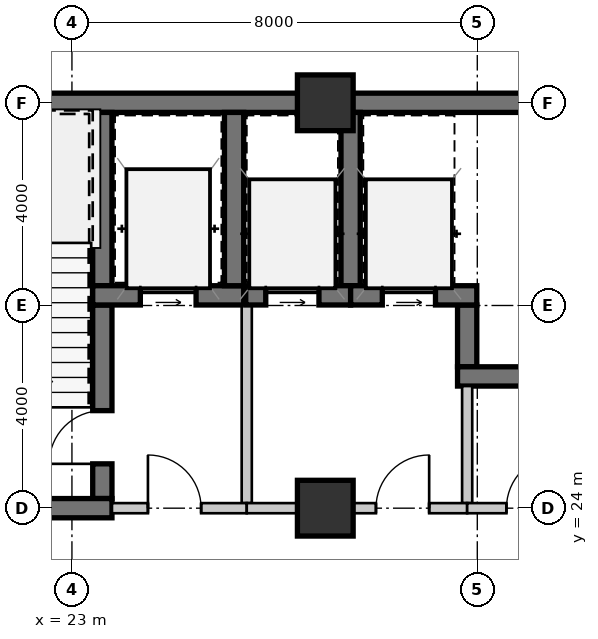
"""IFC4 building model, lengths in metres.
Left out: names, types, materials, properties, quantities, classifications, styles, units other than length and angle.
Written with IfcOpenShell. Run it as: python <this file> out.ifc"""

import sys

from ifc_helpers import new_model, si_unit, direction, frame, frame_2d, origin, origin_2d, place, context, subcontext, project, spatial, rectangle, extrude, source, transform, mapped, element, fill, save


model = new_model("IFC4")
c1 = context("Model", 3, precision=1e-05, world=origin(), true_north=direction((0.0, 1.0)))
c2 = subcontext(c1, "Body", "Model", "MODEL_VIEW")
j1 = project(units=[si_unit("LENGTHUNIT", "METRE"), si_unit("PLANEANGLEUNIT", "RADIAN")], contexts=[c1])
p1 = place(None, origin())
s1 = spatial("IfcSite", under=j1, at=p1, CompositionType="ELEMENT")
p2 = place(p1, origin())
s2 = spatial("IfcBuilding", under=s1, at=p2, CompositionType="ELEMENT")
p3 = place(p2, frame((0.0, 0.0, 12.95)))
s3 = spatial("IfcBuildingStorey", under=s2, at=p3, CompositionType="ELEMENT", Elevation=12.95)
m1 = source(origin(), c2, "Body", "SweptSolid", [
    extrude(rectangle(XDim=1.1, YDim=1.1, at=origin_2d()), origin(), (0.0, 0.0, 1.0), 3.85),
])
for number, where, z_axis, x_axis in (
    (1, (28.0, 24.0, 0.0), (0.0, 0.0, 1.0), (1.0, 0.0, 0.0)),
    (2, (28.0, 32.0, 0.0), (0.0, 0.0, 1.0), (1.0, 0.0, 0.0)),
):
    element("IfcColumn", number, at=place(p3, frame(where, z_axis=z_axis, x_axis=x_axis)), inside=s3, PredefinedType="COLUMN", context=c2, shape_type="MappedRepresentation", body=[
        mapped(m1, transform((0.0, 0.0, 0.0), scale=1.0)),
    ])
m2 = source(origin(), c2, "Body", "SweptSolid", [
    extrude(rectangle(XDim=9.19, YDim=0.38, at=frame_2d((4.595, 0.0))), origin(), (0.0, 0.0, 1.0), 3.43),
])
p4 = place(p3, frame((18.81, 32.0, 0.0), z_axis=(0.0, 0.0, 1.0), x_axis=(1.0, 0.0, 0.0)))
e3 = element("IfcWall", 3, at=p4, inside=s3, PredefinedType="SHEAR", context=c2, shape_type="MappedRepresentation", body=[
    mapped(m2, transform((0.0, 0.0, 0.0), scale=1.0)),
])
m3 = source(origin(), c2, "Body", "SweptSolid", [
    extrude(rectangle(XDim=11.2, YDim=0.38, at=frame_2d((5.6, 0.0))), origin(), (0.0, 0.0, 1.0), 3.43),
])
p5 = place(p3, frame((28.0, 32.0, 0.0), z_axis=(0.0, 0.0, 1.0), x_axis=(1.0, 0.0, 0.0)))
e4 = element("IfcWall", 4, at=p5, inside=s3, PredefinedType="SHEAR", context=c2, shape_type="MappedRepresentation", body=[
    mapped(m3, transform((0.0, 0.0, 0.0), scale=1.0)),
])
m4 = source(origin(), c2, "Body", "SweptSolid", [
    extrude(rectangle(XDim=3.42, YDim=0.38, at=frame_2d((1.71, 0.0))), origin(), (0.0, 0.0, 1.0), 3.43),
])
p6 = place(p3, frame((23.6, 28.39, 0.0), z_axis=(0.0, 0.0, 1.0), x_axis=(0.0, 1.0, 0.0)))
e5 = element("IfcWall", 5, at=p6, inside=s3, PredefinedType="SHEAR", context=c2, shape_type="MappedRepresentation", body=[
    mapped(m4, transform((0.0, 0.0, 0.0), scale=1.0)),
])
m5 = source(origin(), c2, "Body", "SweptSolid", [
    extrude(rectangle(XDim=3.82, YDim=0.38, at=frame_2d((1.91, 0.0))), origin(), (0.0, 0.0, 1.0), 3.43),
])
p7 = place(p3, frame((23.6, 24.19, 0.0), z_axis=(0.0, 0.0, 1.0), x_axis=(0.0, 1.0, 0.0)))
e6 = element("IfcWall", 6, at=p7, inside=s3, PredefinedType="SHEAR", context=c2, shape_type="MappedRepresentation", body=[
    mapped(m5, transform((0.0, 0.0, 0.0), scale=1.0)),
])
m6 = source(origin(), c2, "Body", "SweptSolid", [
    extrude(rectangle(XDim=1.05, YDim=2.1, at=frame_2d((0.525, 1.05))), frame((0.0, 0.2, 0.0), z_axis=(0.0, -1.0, 0.0), x_axis=(1.0, 0.0, 0.0)), (0.0, 0.0, 1.0), 0.4),
])
p8 = place(p7, frame((0.685, 0.0, 0.0)))
e7 = element("IfcOpeningElement", 7, at=p8, cuts=e6, PredefinedType="OPENING", context=c2, shape_type="MappedRepresentation", body=[
    mapped(m6, transform((0.0, 0.0, 0.0), scale=1.0)),
])
m7 = source(origin(), c2, "Body", "SweptSolid", [
    extrude(rectangle(XDim=4.98, YDim=0.38, at=frame_2d((2.49, 0.0))), origin(), (0.0, 0.0, 1.0), 3.43),
])
p9 = place(p3, frame((18.81, 24.0, 0.0), z_axis=(0.0, 0.0, 1.0), x_axis=(1.0, 0.0, 0.0)))
e8 = element("IfcWall", 8, at=p9, inside=s3, PredefinedType="SHEAR", context=c2, shape_type="MappedRepresentation", body=[
    mapped(m7, transform((0.0, 0.0, 0.0), scale=1.0)),
])
m8 = source(origin(), c2, "Body", "SweptSolid", [
    extrude(rectangle(XDim=2.98, YDim=0.38, at=frame_2d((1.49, 0.0))), origin(), (0.0, 0.0, 1.0), 3.43),
])
p10 = place(p3, frame((23.41, 28.2, 0.0), z_axis=(0.0, 0.0, 1.0), x_axis=(1.0, 0.0, 0.0)))
e9 = element("IfcWall", 9, at=p10, inside=s3, PredefinedType="SHEAR", context=c2, shape_type="MappedRepresentation", body=[
    mapped(m8, transform((0.0, 0.0, 0.0), scale=1.0)),
])
m9 = source(origin(), c2, "Body", "SweptSolid", [
    extrude(rectangle(XDim=1.1, YDim=2.15, at=frame_2d((0.55, 1.075))), frame((0.0, 0.2, 0.0), z_axis=(0.0, -1.0, 0.0), x_axis=(1.0, 0.0, 0.0)), (0.0, 0.0, 1.0), 0.4),
])
p11 = place(p10, frame((0.94, 0.0, 0.0)))
e10 = element("IfcOpeningElement", 10, at=p11, cuts=e9, PredefinedType="OPENING", context=c2, shape_type="MappedRepresentation", body=[
    mapped(m9, transform((0.0, 0.0, 0.0), scale=1.0)),
])
p12 = place(p3, frame((26.2, 28.39, 0.0), z_axis=(0.0, 0.0, 1.0), x_axis=(0.0, 1.0, 0.0)))
e11 = element("IfcWall", 11, at=p12, inside=s3, PredefinedType="SHEAR", context=c2, shape_type="MappedRepresentation", body=[
    mapped(m4, transform((0.0, 0.0, 0.0), scale=1.0)),
])
m10 = source(origin(), c2, "Body", "SweptSolid", [
    extrude(rectangle(XDim=3.91, YDim=0.2, at=frame_2d((1.955, 0.0))), origin(), (0.0, 0.0, 1.0), 3.43),
])
p13 = place(p3, frame((26.45, 24.1, 0.0), z_axis=(0.0, 0.0, 1.0), x_axis=(0.0, 1.0, 0.0)))
e12 = element("IfcWall", 12, at=p13, inside=s3, PredefinedType="SOLIDWALL", context=c2, shape_type="MappedRepresentation", body=[
    mapped(m10, transform((0.0, 0.0, 0.0), scale=1.0)),
])
m11 = source(origin(), c2, "Body", "SweptSolid", [
    extrude(rectangle(XDim=2.66, YDim=0.2, at=frame_2d((1.33, 0.0))), origin(), (0.0, 0.0, 1.0), 2.97),
])
p14 = place(p3, frame((23.79, 24.0, 0.0), z_axis=(0.0, 0.0, 1.0), x_axis=(1.0, 0.0, 0.0)))
e13 = element("IfcWall", 13, at=p14, inside=s3, PredefinedType="SOLIDWALL", context=c2, shape_type="MappedRepresentation", body=[
    mapped(m11, transform((0.0, 0.0, 0.0), scale=1.0)),
])
m12 = source(origin(), c2, "Body", "SweptSolid", [
    extrude(rectangle(XDim=1.05, YDim=2.1, at=frame_2d((0.525, 1.05))), frame((0.0, 0.11, 0.0), z_axis=(0.0, -1.0, 0.0), x_axis=(1.0, 0.0, 0.0)), (0.0, 0.0, 1.0), 0.22),
])
p15 = place(p14, frame((0.71, 0.0, 0.0)))
e14 = element("IfcOpeningElement", 14, at=p15, cuts=e13, PredefinedType="OPENING", context=c2, shape_type="MappedRepresentation", body=[
    mapped(m12, transform((0.0, 0.0, 0.0), scale=1.0)),
])
m13 = source(origin(), c2, "Body", "SweptSolid", [
    extrude(rectangle(XDim=1.22, YDim=0.38, at=frame_2d((0.61, 0.0))), origin(), (0.0, 0.0, 1.0), 3.43),
])
p16 = place(p3, frame((30.8, 28.01, 0.0), z_axis=(0.0, 0.0, 1.0), x_axis=(0.0, -1.0, 0.0)))
e15 = element("IfcWall", 15, at=p16, inside=s3, PredefinedType="SHEAR", context=c2, shape_type="MappedRepresentation", body=[
    mapped(m13, transform((0.0, 0.0, 0.0), scale=1.0)),
])
m14 = source(origin(), c2, "Body", "SweptSolid", [
    extrude(rectangle(XDim=2.24, YDim=0.38, at=frame_2d((1.12, 0.0))), origin(), (0.0, 0.0, 1.0), 3.43),
])
p17 = place(p3, frame((30.61, 26.6, 0.0), z_axis=(0.0, 0.0, 1.0), x_axis=(1.0, 0.0, 0.0)))
e16 = element("IfcWall", 16, at=p17, inside=s3, PredefinedType="SHEAR", context=c2, shape_type="MappedRepresentation", body=[
    mapped(m14, transform((0.0, 0.0, 0.0), scale=1.0)),
])
p18 = place(p3, frame((28.5, 28.39, 0.0), z_axis=(0.0, 0.0, 1.0), x_axis=(0.0, 1.0, 0.0)))
e17 = element("IfcWall", 17, at=p18, inside=s3, PredefinedType="SHEAR", context=c2, shape_type="MappedRepresentation", body=[
    mapped(m4, transform((0.0, 0.0, 0.0), scale=1.0)),
])
m15 = source(origin(), c2, "Body", "SweptSolid", [
    extrude(rectangle(XDim=2.07, YDim=0.38, at=frame_2d((1.035, 0.0))), origin(), (0.0, 0.0, 1.0), 3.43),
])
p19 = place(p3, frame((26.43, 28.2, 0.0), z_axis=(0.0, 0.0, 1.0), x_axis=(1.0, 0.0, 0.0)))
e18 = element("IfcWall", 18, at=p19, inside=s3, PredefinedType="SHEAR", context=c2, shape_type="MappedRepresentation", body=[
    mapped(m15, transform((0.0, 0.0, 0.0), scale=1.0)),
])
m16 = source(origin(), c2, "Body", "SweptSolid", [
    extrude(rectangle(XDim=1.05, YDim=2.15, at=frame_2d((0.525, 1.075))), frame((0.0, 0.2, 0.0), z_axis=(0.0, -1.0, 0.0), x_axis=(1.0, 0.0, 0.0)), (0.0, 0.0, 1.0), 0.4),
])
p20 = place(p19, frame((0.395, 0.0, 0.0)))
e19 = element("IfcOpeningElement", 19, at=p20, cuts=e18, PredefinedType="OPENING", context=c2, shape_type="MappedRepresentation", body=[
    mapped(m16, transform((0.0, 0.0, 0.0), scale=1.0)),
])
m17 = source(origin(), c2, "Body", "SweptSolid", [
    extrude(rectangle(XDim=2.49, YDim=0.38, at=frame_2d((1.245, 0.0))), origin(), (0.0, 0.0, 1.0), 3.43),
])
p21 = place(p3, frame((28.5, 28.2, 0.0), z_axis=(0.0, 0.0, 1.0), x_axis=(1.0, 0.0, 0.0)))
e20 = element("IfcWall", 20, at=p21, inside=s3, PredefinedType="SHEAR", context=c2, shape_type="MappedRepresentation", body=[
    mapped(m17, transform((0.0, 0.0, 0.0), scale=1.0)),
])
p22 = place(p21, frame((0.625, 0.0, 0.0)))
e21 = element("IfcOpeningElement", 21, at=p22, cuts=e20, PredefinedType="OPENING", context=c2, shape_type="MappedRepresentation", body=[
    mapped(m16, transform((0.0, 0.0, 0.0), scale=1.0)),
])
m18 = source(origin(), c2, "Body", "SweptSolid", [
    extrude(rectangle(XDim=2.31, YDim=0.2, at=frame_2d((1.155, 0.0))), origin(), (0.0, 0.0, 1.0), 3.43),
])
p23 = place(p3, frame((30.8, 26.41, 0.0), z_axis=(0.0, 0.0, 1.0), x_axis=(0.0, -1.0, 0.0)))
e22 = element("IfcWall", 22, at=p23, inside=s3, PredefinedType="SOLIDWALL", context=c2, shape_type="MappedRepresentation", body=[
    mapped(m18, transform((0.0, 0.0, 0.0), scale=1.0)),
])
m19 = source(origin(), c2, "Body", "SweptSolid", [
    extrude(rectangle(XDim=4.35, YDim=0.2, at=frame_2d((2.175, 0.0))), origin(), (0.0, 0.0, 1.0), 2.97),
])
p24 = place(p3, frame((30.8, 24.0, 0.0), z_axis=(0.0, 0.0, 1.0), x_axis=(-1.0, 0.0, 0.0)))
e23 = element("IfcWall", 23, at=p24, inside=s3, PredefinedType="SOLIDWALL", context=c2, shape_type="MappedRepresentation", body=[
    mapped(m19, transform((0.0, 0.0, 0.0), scale=1.0)),
])
p25 = place(p24, frame((0.75, 0.0, 0.0)))
e24 = element("IfcOpeningElement", 24, at=p25, cuts=e23, PredefinedType="OPENING", context=c2, shape_type="MappedRepresentation", body=[
    mapped(m12, transform((0.0, 0.0, 0.0), scale=1.0)),
])
m20 = source(origin(), c2, "Body", "SweptSolid", [
    extrude(rectangle(XDim=2.6, YDim=0.2, at=frame_2d((1.3, 0.0))), origin(), (0.0, 0.0, 1.0), 2.97),
])
p26 = place(p3, frame((33.4, 24.0, 0.0), z_axis=(0.0, 0.0, 1.0), x_axis=(-1.0, 0.0, 0.0)))
e25 = element("IfcWall", 25, at=p26, inside=s3, PredefinedType="SOLIDWALL", context=c2, shape_type="MappedRepresentation", body=[
    mapped(m20, transform((0.0, 0.0, 0.0), scale=1.0)),
])
p27 = place(p26, frame((0.775, 0.0, 0.0)))
e26 = element("IfcOpeningElement", 26, at=p27, cuts=e25, PredefinedType="OPENING", context=c2, shape_type="MappedRepresentation", body=[
    mapped(m12, transform((0.0, 0.0, 0.0), scale=1.0)),
])
m21 = source(origin(), c2, "Body", "SweptSolid", [
    extrude(rectangle(XDim=1.05, YDim=2.1, at=frame_2d((0.525, 1.05))), frame((0.0, 0.025, 0.0), z_axis=(0.0, -1.0, 0.0), x_axis=(1.0, 0.0, 0.0)), (0.0, 0.0, 1.0), 0.05),
])
p28 = place(p8, origin())
e27 = element("IfcDoor", 27, at=p28, inside=s3, OperationType="SINGLE_SWING_LEFT", PredefinedType="DOOR", context=c2, shape_type="MappedRepresentation", body=[
    mapped(m21, transform((0.0, 0.0, 0.0), scale=1.0)),
])
fill(e7, e27)
m22 = source(origin(), c2, "Body", "SweptSolid", [
    extrude(rectangle(XDim=1.1, YDim=2.15, at=frame_2d((0.55, 1.075))), frame((0.0, 0.025, 0.0), z_axis=(0.0, -1.0, 0.0), x_axis=(1.0, 0.0, 0.0)), (0.0, 0.0, 1.0), 0.05),
])
p29 = place(p11, origin())
e28 = element("IfcDoor", 28, at=p29, inside=s3, OperationType="SLIDING_TO_LEFT", PredefinedType="DOOR", context=c2, shape_type="MappedRepresentation", body=[
    mapped(m22, transform((0.0, 0.0, 0.0), scale=1.0)),
])
fill(e10, e28)
p30 = place(p15, origin())
e29 = element("IfcDoor", 29, at=p30, inside=s3, OperationType="SINGLE_SWING_LEFT", PredefinedType="DOOR", context=c2, shape_type="MappedRepresentation", body=[
    mapped(m21, transform((0.0, 0.0, 0.0), scale=1.0)),
])
fill(e14, e29)
m23 = source(origin(), c2, "Body", "SweptSolid", [
    extrude(rectangle(XDim=1.05, YDim=2.15, at=frame_2d((0.525, 1.075))), frame((0.0, 0.025, 0.0), z_axis=(0.0, -1.0, 0.0), x_axis=(1.0, 0.0, 0.0)), (0.0, 0.0, 1.0), 0.05),
])
p31 = place(p20, origin())
e30 = element("IfcDoor", 30, at=p31, inside=s3, OperationType="SLIDING_TO_LEFT", PredefinedType="DOOR", context=c2, shape_type="MappedRepresentation", body=[
    mapped(m23, transform((0.0, 0.0, 0.0), scale=1.0)),
])
fill(e19, e30)
p32 = place(p22, origin())
e31 = element("IfcDoor", 31, at=p32, inside=s3, OperationType="SLIDING_TO_LEFT", PredefinedType="DOOR", context=c2, shape_type="MappedRepresentation", body=[
    mapped(m23, transform((0.0, 0.0, 0.0), scale=1.0)),
])
fill(e21, e31)
p33 = place(p25, frame((1.05, 0.0, 0.0), z_axis=(0.0, 0.0, 1.0), x_axis=(-1.0, 0.0, 0.0)))
e32 = element("IfcDoor", 32, at=p33, inside=s3, OperationType="SINGLE_SWING_RIGHT", PredefinedType="DOOR", context=c2, shape_type="MappedRepresentation", body=[
    mapped(m21, transform((0.0, 0.0, 0.0), scale=1.0)),
])
fill(e24, e32)
p34 = place(p27, frame((1.05, 0.0, 0.0), z_axis=(0.0, 0.0, 1.0), x_axis=(-1.0, 0.0, 0.0)))
e33 = element("IfcDoor", 33, at=p34, inside=s3, OperationType="SINGLE_SWING_RIGHT", PredefinedType="DOOR", context=c2, shape_type="MappedRepresentation", body=[
    mapped(m21, transform((0.0, 0.0, 0.0), scale=1.0)),
])
fill(e26, e33)
save(model, sys.argv[1])
